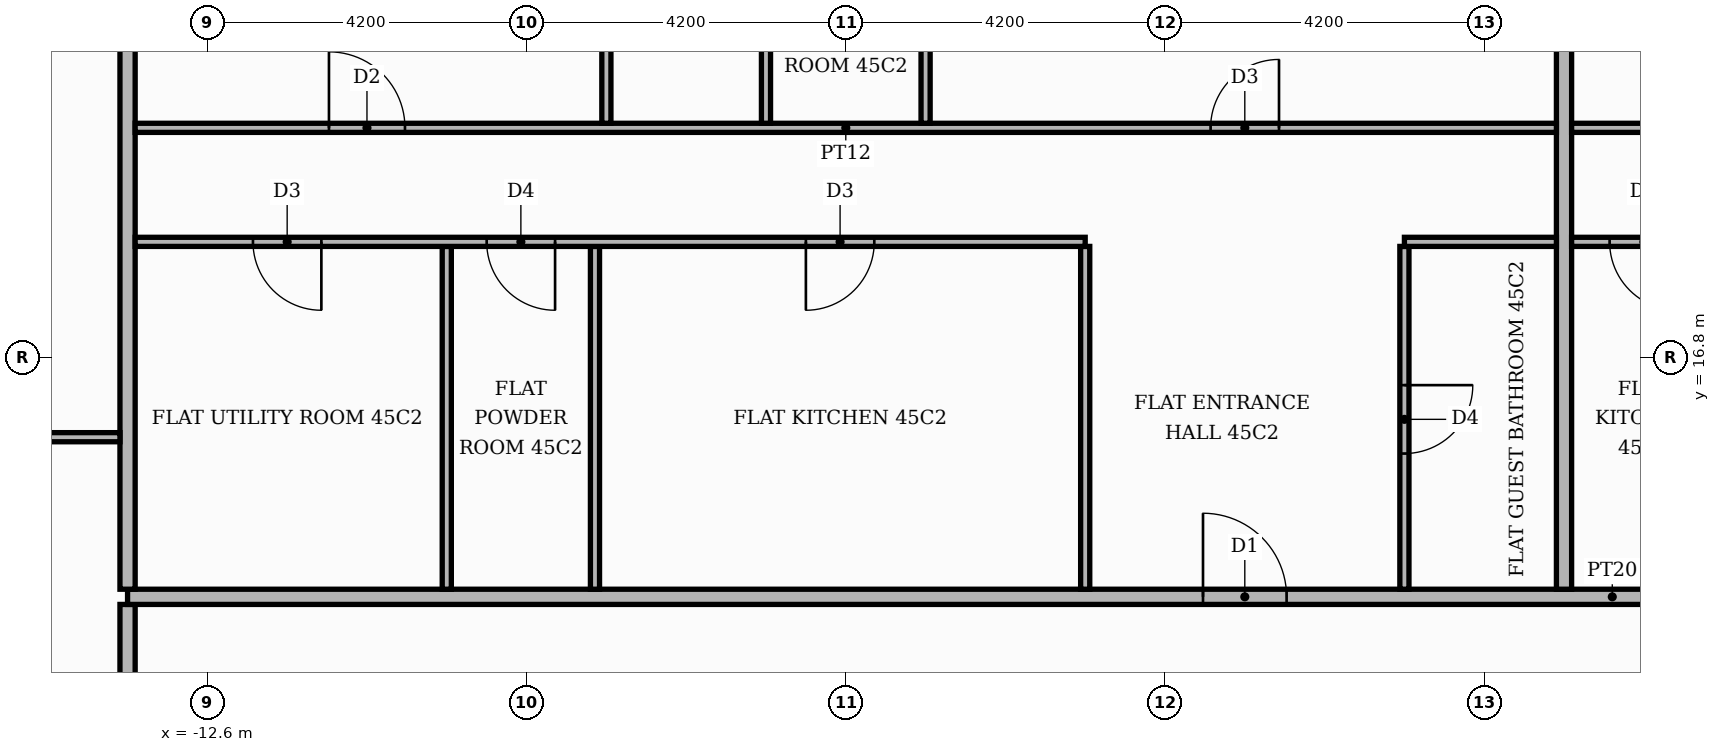
"""IFC4 building model, lengths in metres.
Left out: names, types, materials, properties, quantities, classifications, styles, units other than length and angle.
Written with IfcOpenShell. Run it as: python <this file> out.ifc"""

import sys

from ifc_helpers import new_model, si_unit, direction, frame, frame_2d, origin, place, context, subcontext, project, spatial, rectangle, extrude, element, fill, save


model = new_model("IFC4")
c1 = context("Model", 3, precision=1e-05, world=origin(), true_north=direction((0.0, 1.0)))
c2 = subcontext(c1, "Body", "Model", "MODEL_VIEW")
j1 = project(units=[si_unit("LENGTHUNIT", "METRE"), si_unit("PLANEANGLEUNIT", "RADIAN")], contexts=[c1])
p1 = place(None, origin())
s1 = spatial("IfcSite", under=j1, at=p1, CompositionType="ELEMENT")
p2 = place(p1, origin())
s2 = spatial("IfcBuilding", under=s1, at=p2, CompositionType="ELEMENT")
p3 = place(p2, frame((0.0, 0.0, 192.3)))
s3 = spatial("IfcBuildingStorey", under=s2, at=p3, CompositionType="ELEMENT", Elevation=192.3)
p4 = place(p3, frame((-13.65, 5.35, 0.0), z_axis=(0.0, 0.0, 1.0), x_axis=(0.0, 1.0, 0.0)))
e1 = element("IfcWall", 1, at=p4, inside=s3, PredefinedType="PARTITIONING", context=c2, shape_type="SweptSolid", body=[
    extrude(rectangle(XDim=8.2, YDim=0.2, at=frame_2d((4.1, 0.0))), origin(), (0.0, 0.0, 1.0), 3.48),
])
p5 = place(p4, frame((5.65, 0.0, 0.0)))
e2 = element("IfcOpeningElement", 2, at=p5, cuts=e1, PredefinedType="OPENING", context=c2, shape_type="SweptSolid", body=[
    extrude(rectangle(XDim=1.1, YDim=2.4, at=frame_2d((0.55, 1.2))), frame((0.0, 0.11, 0.0), z_axis=(0.0, -1.0, 0.0), x_axis=(1.0, 0.0, 0.0)), (0.0, 0.0, 1.0), 0.22),
])
p6 = place(p3, frame((-13.65, 13.65, 0.0), z_axis=(0.0, 0.0, 1.0), x_axis=(1.0, 0.0, 0.0)))
e3 = element("IfcWall", 3, at=p6, inside=s3, PredefinedType="PARTITIONING", context=c2, shape_type="SweptSolid", body=[
    extrude(rectangle(XDim=39.07, YDim=0.2, at=frame_2d((19.535, 0.0))), origin(), (0.0, 0.0, 1.0), 3.48),
])
p7 = place(p6, frame((24.65, 0.0, 0.0)))
e4 = element("IfcOpeningElement", 4, at=p7, cuts=e3, PredefinedType="OPENING", context=c2, shape_type="SweptSolid", body=[
    extrude(rectangle(XDim=1.1, YDim=2.4, at=frame_2d((0.55, 1.2))), frame((0.0, 0.11, 0.0), z_axis=(0.0, -1.0, 0.0), x_axis=(1.0, 0.0, 0.0)), (0.0, 0.0, 1.0), 0.22),
])
p8 = place(p6, frame((14.15, 0.0, 0.0)))
e5 = element("IfcOpeningElement", 5, at=p8, cuts=e3, PredefinedType="OPENING", context=c2, shape_type="SweptSolid", body=[
    extrude(rectangle(XDim=1.1, YDim=2.4, at=frame_2d((0.55, 1.2))), frame((0.0, 0.11, 0.0), z_axis=(0.0, -1.0, 0.0), x_axis=(1.0, 0.0, 0.0)), (0.0, 0.0, 1.0), 0.22),
])
p9 = place(p3, frame((-13.65, 13.75, 0.0), z_axis=(0.0, 0.0, 1.0), x_axis=(0.0, 1.0, 0.0)))
e6 = element("IfcWall", 6, at=p9, inside=s3, PredefinedType="PARTITIONING", context=c2, shape_type="SweptSolid", body=[
    extrude(rectangle(XDim=11.67, YDim=0.2, at=frame_2d((5.835, 0.0))), origin(), (0.0, 0.0, 1.0), 3.48),
])
for number, where, z_axis, x_axis in (
    (7, (-9.45, 13.75, 0.0), (0.0, 0.0, 1.0), (0.0, 1.0, 0.0)),
    (8, (-7.5, 13.75, 0.0), (0.0, 0.0, 1.0), (0.0, 1.0, 0.0)),
    (9, (-1.05, 13.75, 0.0), (0.0, 0.0, 1.0), (0.0, 1.0, 0.0)),
):
    element("IfcWall", number, at=place(p3, frame(where, z_axis=z_axis, x_axis=x_axis)), inside=s3, PredefinedType="PARTITIONING", context=c2, shape_type="SweptSolid", body=[
        extrude(rectangle(XDim=4.51, YDim=0.12, at=frame_2d((2.255, 0.0))), origin(), (0.0, 0.0, 1.0), 3.48),
    ])
p10 = place(p3, frame((3.15, 13.75, 0.0), z_axis=(0.0, 0.0, 1.0), x_axis=(0.0, 1.0, 0.0)))
e10 = element("IfcWall", 10, at=p10, inside=s3, PredefinedType="PARTITIONING", context=c2, shape_type="SweptSolid", body=[
    extrude(rectangle(XDim=4.51, YDim=0.12, at=frame_2d((2.255, 0.0))), origin(), (0.0, 0.0, 1.0), 3.48),
])
p11 = place(p10, frame((1.785, 0.0, 0.0)))
e11 = element("IfcOpeningElement", 11, at=p11, cuts=e10, PredefinedType="OPENING", context=c2, shape_type="SweptSolid", body=[
    extrude(rectangle(XDim=0.9, YDim=2.1, at=frame_2d((0.45, 1.05))), frame((0.0, 0.07, 0.0), z_axis=(0.0, -1.0, 0.0), x_axis=(1.0, 0.0, 0.0)), (0.0, 0.0, 1.0), 0.14),
])
p12 = place(p3, frame((5.25, 13.75, 0.0), z_axis=(0.0, 0.0, 1.0), x_axis=(0.0, 1.0, 0.0)))
e12 = element("IfcWall", 12, at=p12, inside=s3, PredefinedType="PARTITIONING", context=c2, shape_type="SweptSolid", body=[
    extrude(rectangle(XDim=11.67, YDim=0.2, at=frame_2d((5.835, 0.0))), origin(), (0.0, 0.0, 1.0), 3.48),
])
p13 = place(p3, frame((-19.82, 15.75, 0.0), z_axis=(0.0, 0.0, 1.0), x_axis=(1.0, 0.0, 0.0)))
e13 = element("IfcWall", 13, at=p13, inside=s3, PredefinedType="PARTITIONING", context=c2, shape_type="SweptSolid", body=[
    extrude(rectangle(XDim=6.07, YDim=0.12, at=frame_2d((3.035, 0.0))), origin(), (0.0, 0.0, 1.0), 3.48),
])
p14 = place(p13, frame((2.585, 0.0, 0.0)))
e14 = element("IfcOpeningElement", 14, at=p14, cuts=e13, PredefinedType="OPENING", context=c2, shape_type="SweptSolid", body=[
    extrude(rectangle(XDim=1.0, YDim=2.1, at=frame_2d((0.5, 1.05))), frame((0.0, 0.07, 0.0), z_axis=(0.0, -1.0, 0.0), x_axis=(1.0, 0.0, 0.0)), (0.0, 0.0, 1.0), 0.14),
])
p15 = place(p3, frame((-13.55, 18.32, 0.0), z_axis=(0.0, 0.0, 1.0), x_axis=(1.0, 0.0, 0.0)))
e15 = element("IfcWall", 15, at=p15, inside=s3, PredefinedType="PARTITIONING", context=c2, shape_type="SweptSolid", body=[
    extrude(rectangle(XDim=12.5, YDim=0.12, at=frame_2d((6.25, 0.0))), origin(), (0.0, 0.0, 1.0), 3.48),
])
p16 = place(p15, frame((8.825, 0.0, 0.0)))
e16 = element("IfcOpeningElement", 16, at=p16, cuts=e15, PredefinedType="OPENING", context=c2, shape_type="SweptSolid", body=[
    extrude(rectangle(XDim=0.9, YDim=2.1, at=frame_2d((0.45, 1.05))), frame((0.0, 0.07, 0.0), z_axis=(0.0, -1.0, 0.0), x_axis=(1.0, 0.0, 0.0)), (0.0, 0.0, 1.0), 0.14),
])
p17 = place(p15, frame((4.625, 0.0, 0.0)))
e17 = element("IfcOpeningElement", 17, at=p17, cuts=e15, PredefinedType="OPENING", context=c2, shape_type="SweptSolid", body=[
    extrude(rectangle(XDim=0.9, YDim=2.1, at=frame_2d((0.45, 1.05))), frame((0.0, 0.07, 0.0), z_axis=(0.0, -1.0, 0.0), x_axis=(1.0, 0.0, 0.0)), (0.0, 0.0, 1.0), 0.14),
])
p18 = place(p15, frame((1.55, 0.0, 0.0)))
e18 = element("IfcOpeningElement", 18, at=p18, cuts=e15, PredefinedType="OPENING", context=c2, shape_type="SweptSolid", body=[
    extrude(rectangle(XDim=0.9, YDim=2.1, at=frame_2d((0.45, 1.05))), frame((0.0, 0.07, 0.0), z_axis=(0.0, -1.0, 0.0), x_axis=(1.0, 0.0, 0.0)), (0.0, 0.0, 1.0), 0.14),
])
p19 = place(p3, frame((3.15, 18.32, 0.0), z_axis=(0.0, 0.0, 1.0), x_axis=(1.0, 0.0, 0.0)))
e19 = element("IfcWall", 19, at=p19, inside=s3, PredefinedType="PARTITIONING", context=c2, shape_type="SweptSolid", body=[
    extrude(rectangle(XDim=2.0, YDim=0.12, at=frame_2d((1.0, 0.0))), origin(), (0.0, 0.0, 1.0), 3.48),
])
p20 = place(p3, frame((5.35, 18.32, 0.0), z_axis=(0.0, 0.0, 1.0), x_axis=(1.0, 0.0, 0.0)))
e20 = element("IfcWall", 20, at=p20, inside=s3, PredefinedType="PARTITIONING", context=c2, shape_type="SweptSolid", body=[
    extrude(rectangle(XDim=4.1, YDim=0.12, at=frame_2d((2.05, 0.0))), origin(), (0.0, 0.0, 1.0), 3.48),
])
p21 = place(p20, frame((0.5, 0.0, 0.0)))
e21 = element("IfcOpeningElement", 21, at=p21, cuts=e20, PredefinedType="OPENING", context=c2, shape_type="SweptSolid", body=[
    extrude(rectangle(XDim=0.9, YDim=2.1, at=frame_2d((0.45, 1.05))), frame((0.0, 0.07, 0.0), z_axis=(0.0, -1.0, 0.0), x_axis=(1.0, 0.0, 0.0)), (0.0, 0.0, 1.0), 0.14),
])
p22 = place(p3, frame((-13.55, 19.82, 0.0), z_axis=(0.0, 0.0, 1.0), x_axis=(1.0, 0.0, 0.0)))
e22 = element("IfcWall", 22, at=p22, inside=s3, PredefinedType="PARTITIONING", context=c2, shape_type="SweptSolid", body=[
    extrude(rectangle(XDim=18.7, YDim=0.12, at=frame_2d((9.35, 0.0))), origin(), (0.0, 0.0, 1.0), 3.48),
])
p23 = place(p22, frame((14.15, 0.0, 0.0)))
e23 = element("IfcOpeningElement", 23, at=p23, cuts=e22, PredefinedType="OPENING", context=c2, shape_type="SweptSolid", body=[
    extrude(rectangle(XDim=0.9, YDim=2.1, at=frame_2d((0.45, 1.05))), frame((0.0, 0.07, 0.0), z_axis=(0.0, -1.0, 0.0), x_axis=(1.0, 0.0, 0.0)), (0.0, 0.0, 1.0), 0.14),
])
p24 = place(p22, frame((2.55, 0.0, 0.0)))
e24 = element("IfcOpeningElement", 24, at=p24, cuts=e22, PredefinedType="OPENING", context=c2, shape_type="SweptSolid", body=[
    extrude(rectangle(XDim=1.0, YDim=2.1, at=frame_2d((0.5, 1.05))), frame((0.0, 0.07, 0.0), z_axis=(0.0, -1.0, 0.0), x_axis=(1.0, 0.0, 0.0)), (0.0, 0.0, 1.0), 0.14),
])
p25 = place(p3, frame((5.35, 19.82, 0.0), z_axis=(0.0, 0.0, 1.0), x_axis=(1.0, 0.0, 0.0)))
e25 = element("IfcWall", 25, at=p25, inside=s3, PredefinedType="PARTITIONING", context=c2, shape_type="SweptSolid", body=[
    extrude(rectangle(XDim=12.25, YDim=0.12, at=frame_2d((6.125, 0.0))), origin(), (0.0, 0.0, 1.0), 3.48),
])
p26 = place(p25, frame((8.85, 0.0, 0.0)))
e26 = element("IfcOpeningElement", 26, at=p26, cuts=e25, PredefinedType="OPENING", context=c2, shape_type="SweptSolid", body=[
    extrude(rectangle(XDim=1.0, YDim=2.1, at=frame_2d((0.5, 1.05))), frame((0.0, 0.07, 0.0), z_axis=(0.0, -1.0, 0.0), x_axis=(1.0, 0.0, 0.0)), (0.0, 0.0, 1.0), 0.14),
])
p27 = place(p25, frame((5.75, 0.0, 0.0)))
e27 = element("IfcOpeningElement", 27, at=p27, cuts=e25, PredefinedType="OPENING", context=c2, shape_type="SweptSolid", body=[
    extrude(rectangle(XDim=0.9, YDim=2.1, at=frame_2d((0.45, 1.05))), frame((0.0, 0.07, 0.0), z_axis=(0.0, -1.0, 0.0), x_axis=(1.0, 0.0, 0.0)), (0.0, 0.0, 1.0), 0.14),
])
p28 = place(p3, frame((-7.35, 19.88, 0.0), z_axis=(0.0, 0.0, 1.0), x_axis=(0.0, 1.0, 0.0)))
e28 = element("IfcWall", 28, at=p28, inside=s3, PredefinedType="PARTITIONING", context=c2, shape_type="SweptSolid", body=[
    extrude(rectangle(XDim=5.54, YDim=0.12, at=frame_2d((2.77, 0.0))), origin(), (0.0, 0.0, 1.0), 3.48),
])
p29 = place(p3, frame((-5.25, 19.88, 0.0), z_axis=(0.0, 0.0, 1.0), x_axis=(0.0, 1.0, 0.0)))
e29 = element("IfcWall", 29, at=p29, inside=s3, PredefinedType="PARTITIONING", context=c2, shape_type="SweptSolid", body=[
    extrude(rectangle(XDim=5.54, YDim=0.12, at=frame_2d((2.77, 0.0))), origin(), (0.0, 0.0, 1.0), 3.48),
])
p30 = place(p29, frame((2.44, 0.0, 0.0)))
e30 = element("IfcOpeningElement", 30, at=p30, cuts=e29, PredefinedType="OPENING", context=c2, shape_type="SweptSolid", body=[
    extrude(rectangle(XDim=0.9, YDim=2.1, at=frame_2d((0.45, 1.05))), frame((0.0, 0.07, 0.0), z_axis=(0.0, -1.0, 0.0), x_axis=(1.0, 0.0, 0.0)), (0.0, 0.0, 1.0), 0.14),
])
p31 = place(p3, frame((-3.15, 19.88, 0.0), z_axis=(0.0, 0.0, 1.0), x_axis=(0.0, 1.0, 0.0)))
e31 = element("IfcWall", 31, at=p31, inside=s3, PredefinedType="PARTITIONING", context=c2, shape_type="SweptSolid", body=[
    extrude(rectangle(XDim=5.54, YDim=0.12, at=frame_2d((2.77, 0.0))), origin(), (0.0, 0.0, 1.0), 3.48),
])
p32 = place(p31, frame((2.44, 0.0, 0.0)))
e32 = element("IfcOpeningElement", 32, at=p32, cuts=e31, PredefinedType="OPENING", context=c2, shape_type="SweptSolid", body=[
    extrude(rectangle(XDim=0.9, YDim=2.1, at=frame_2d((0.45, 1.05))), frame((0.0, 0.07, 0.0), z_axis=(0.0, -1.0, 0.0), x_axis=(1.0, 0.0, 0.0)), (0.0, 0.0, 1.0), 0.14),
])
p33 = place(p21, frame((0.9, 0.0, 0.0), z_axis=(0.0, 0.0, 1.0), x_axis=(-1.0, 0.0, 0.0)))
e33 = element("IfcDoor", 33, at=p33, inside=s3, OperationType="SINGLE_SWING_RIGHT", PredefinedType="DOOR", context=c2, shape_type="SweptSolid", body=[
    extrude(rectangle(XDim=0.9, YDim=2.1, at=frame_2d((0.45, 1.05))), frame((0.0, 0.025, 0.0), z_axis=(0.0, -1.0, 0.0), x_axis=(1.0, 0.0, 0.0)), (0.0, 0.0, 1.0), 0.05),
])
fill(e21, e33)
p34 = place(p8, origin())
e34 = element("IfcDoor", 34, at=p34, inside=s3, OperationType="SINGLE_SWING_LEFT", PredefinedType="DOOR", context=c2, shape_type="SweptSolid", body=[
    extrude(rectangle(XDim=1.1, YDim=2.4, at=frame_2d((0.55, 1.2))), frame((0.0, 0.025, 0.0), z_axis=(0.0, -1.0, 0.0), x_axis=(1.0, 0.0, 0.0)), (0.0, 0.0, 1.0), 0.05),
])
fill(e5, e34)
p35 = place(p11, frame((0.9, 0.0, 0.0), z_axis=(0.0, 0.0, 1.0), x_axis=(-1.0, 0.0, 0.0)))
e35 = element("IfcDoor", 35, at=p35, inside=s3, OperationType="SINGLE_SWING_RIGHT", PredefinedType="DOOR", context=c2, shape_type="SweptSolid", body=[
    extrude(rectangle(XDim=0.9, YDim=2.1, at=frame_2d((0.45, 1.05))), frame((0.0, 0.025, 0.0), z_axis=(0.0, -1.0, 0.0), x_axis=(1.0, 0.0, 0.0)), (0.0, 0.0, 1.0), 0.05),
])
fill(e11, e35)
p36 = place(p16, frame((0.9, 0.0, 0.0), z_axis=(0.0, 0.0, 1.0), x_axis=(-1.0, 0.0, 0.0)))
e36 = element("IfcDoor", 36, at=p36, inside=s3, OperationType="SINGLE_SWING_LEFT", PredefinedType="DOOR", context=c2, shape_type="SweptSolid", body=[
    extrude(rectangle(XDim=0.9, YDim=2.1, at=frame_2d((0.45, 1.05))), frame((0.0, 0.025, 0.0), z_axis=(0.0, -1.0, 0.0), x_axis=(1.0, 0.0, 0.0)), (0.0, 0.0, 1.0), 0.05),
])
fill(e16, e36)
p37 = place(p17, frame((0.9, 0.0, 0.0), z_axis=(0.0, 0.0, 1.0), x_axis=(-1.0, 0.0, 0.0)))
e37 = element("IfcDoor", 37, at=p37, inside=s3, OperationType="SINGLE_SWING_RIGHT", PredefinedType="DOOR", context=c2, shape_type="SweptSolid", body=[
    extrude(rectangle(XDim=0.9, YDim=2.1, at=frame_2d((0.45, 1.05))), frame((0.0, 0.025, 0.0), z_axis=(0.0, -1.0, 0.0), x_axis=(1.0, 0.0, 0.0)), (0.0, 0.0, 1.0), 0.05),
])
fill(e17, e37)
p38 = place(p18, frame((0.9, 0.0, 0.0), z_axis=(0.0, 0.0, 1.0), x_axis=(-1.0, 0.0, 0.0)))
e38 = element("IfcDoor", 38, at=p38, inside=s3, OperationType="SINGLE_SWING_RIGHT", PredefinedType="DOOR", context=c2, shape_type="SweptSolid", body=[
    extrude(rectangle(XDim=0.9, YDim=2.1, at=frame_2d((0.45, 1.05))), frame((0.0, 0.025, 0.0), z_axis=(0.0, -1.0, 0.0), x_axis=(1.0, 0.0, 0.0)), (0.0, 0.0, 1.0), 0.05),
])
fill(e18, e38)
p39 = place(p23, origin())
e39 = element("IfcDoor", 39, at=p39, inside=s3, OperationType="SINGLE_SWING_RIGHT", PredefinedType="DOOR", context=c2, shape_type="SweptSolid", body=[
    extrude(rectangle(XDim=0.9, YDim=2.1, at=frame_2d((0.45, 1.05))), frame((0.0, 0.025, 0.0), z_axis=(0.0, -1.0, 0.0), x_axis=(1.0, 0.0, 0.0)), (0.0, 0.0, 1.0), 0.05),
])
fill(e23, e39)
p40 = place(p24, origin())
e40 = element("IfcDoor", 40, at=p40, inside=s3, OperationType="SINGLE_SWING_LEFT", PredefinedType="DOOR", context=c2, shape_type="SweptSolid", body=[
    extrude(rectangle(XDim=1.0, YDim=2.1, at=frame_2d((0.5, 1.05))), frame((0.0, 0.025, 0.0), z_axis=(0.0, -1.0, 0.0), x_axis=(1.0, 0.0, 0.0)), (0.0, 0.0, 1.0), 0.05),
])
fill(e24, e40)
save(model, sys.argv[1])
